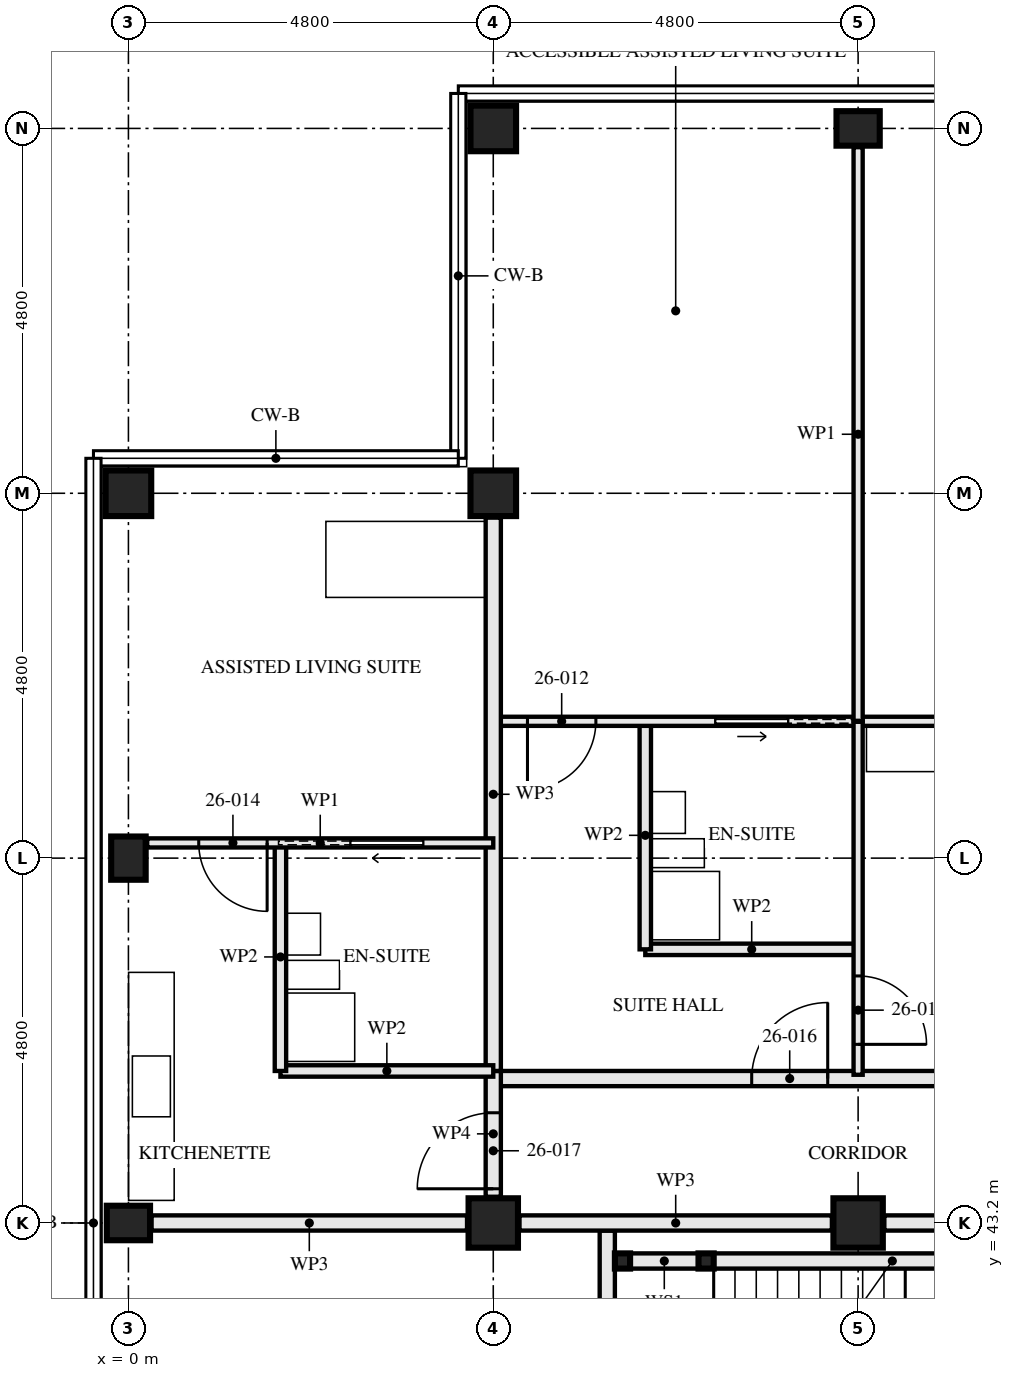
"""IFC4 building model, lengths in metres.
Left out: names, types, materials, properties, quantities, classifications, styles, units other than length and angle.
Written with IfcOpenShell. Run it as: python <this file> out.ifc"""

import sys

from ifc_helpers import new_model, si_unit, direction, frame, frame_2d, origin, origin_2d, place, context, subcontext, project, spatial, rectangle, hollow_rectangle, i_section, extrude, element, fill, save


model = new_model("IFC4")
c1 = context("Model", 3, precision=1e-05, world=origin(), true_north=direction((0.0, 1.0)))
c2 = subcontext(c1, "Body", "Model", "MODEL_VIEW")
j1 = project(units=[si_unit("LENGTHUNIT", "METRE"), si_unit("PLANEANGLEUNIT", "RADIAN")], contexts=[c1])
p1 = place(None, origin())
s1 = spatial("IfcSite", under=j1, at=p1, CompositionType="ELEMENT")
p2 = place(p1, origin())
s2 = spatial("IfcBuilding", under=s1, at=p2, CompositionType="ELEMENT")
p3 = place(p2, frame((0.0, 0.0, 98.0)))
s3 = spatial("IfcBuildingStorey", under=s2, at=p3, CompositionType="ELEMENT", Elevation=98.0)
for number, where, z_axis, x_axis in (
    (1, (0.0, 43.2, 0.0), (0.0, 0.0, 1.0), (0.0, 1.0, 0.0)),
    (2, (0.0, 48.0, 0.0), (0.0, 0.0, 1.0), (1.0, 0.0, 0.0)),
):
    element("IfcColumn", number, at=place(p3, frame(where, z_axis=z_axis, x_axis=x_axis)), inside=s3, PredefinedType="COLUMN", context=c2, shape_type="SweptSolid", body=[
        extrude(i_section(OverallWidth=0.454, OverallDepth=0.569, WebThickness=0.078, FlangeThickness=0.125, FilletRadius=0.015, at=origin_2d()), origin(), (0.0, 0.0, 1.0), 3.5),
    ])
p4 = place(p3, frame((0.0, 52.8, 0.0), z_axis=(0.0, 0.0, 1.0), x_axis=(0.0, 1.0, 0.0)))
e3 = element("IfcColumn", 3, at=p4, inside=s3, PredefinedType="COLUMN", context=c2, shape_type="SweptSolid", body=[
    extrude(hollow_rectangle(XDim=0.6, YDim=0.6, WallThickness=0.05, at=origin_2d()), origin(), (0.0, 0.0, 1.0), 3.5),
])
p5 = place(p3, frame((4.8, 43.2, 0.0), z_axis=(0.0, 0.0, 1.0), x_axis=(0.0, 1.0, 0.0)))
e4 = element("IfcColumn", 4, at=p5, inside=s3, PredefinedType="COLUMN", context=c2, shape_type="SweptSolid", body=[
    extrude(hollow_rectangle(XDim=0.65, YDim=0.65, WallThickness=0.05, at=origin_2d()), origin(), (0.0, 0.0, 1.0), 3.5),
])
for number, where, z_axis, x_axis in (
    (5, (4.8, 52.8, 0.0), (0.0, 0.0, 1.0), (0.0, 1.0, 0.0)),
    (6, (4.8, 57.6, 0.0), (0.0, 0.0, 1.0), (0.0, 1.0, 0.0)),
):
    element("IfcColumn", number, at=place(p3, frame(where, z_axis=z_axis, x_axis=x_axis)), inside=s3, PredefinedType="COLUMN", context=c2, shape_type="SweptSolid", body=[
        extrude(hollow_rectangle(XDim=0.6, YDim=0.6, WallThickness=0.05, at=origin_2d()), origin(), (0.0, 0.0, 1.0), 3.5),
    ])
p6 = place(p3, frame((9.6, 43.2, 0.0), z_axis=(0.0, 0.0, 1.0), x_axis=(0.0, 1.0, 0.0)))
e7 = element("IfcColumn", 7, at=p6, inside=s3, PredefinedType="COLUMN", context=c2, shape_type="SweptSolid", body=[
    extrude(hollow_rectangle(XDim=0.65, YDim=0.65, WallThickness=0.05, at=origin_2d()), origin(), (0.0, 0.0, 1.0), 3.5),
])
p7 = place(p3, frame((9.6, 57.6, 0.0), z_axis=(0.0, 0.0, 1.0), x_axis=(0.0, 1.0, 0.0)))
e8 = element("IfcColumn", 8, at=p7, inside=s3, PredefinedType="COLUMN", context=c2, shape_type="SweptSolid", body=[
    extrude(i_section(OverallWidth=0.454, OverallDepth=0.569, WebThickness=0.078, FlangeThickness=0.125, FilletRadius=0.015, at=origin_2d()), origin(), (0.0, 0.0, 1.0), 3.5),
])
for number, where, z_axis, x_axis in (
    (9, (6.5, 42.7, 0.0), (0.0, 0.0, 1.0), (1.0, 0.0, 0.0)),
    (10, (7.6, 42.7, 0.0), (0.0, 0.0, 1.0), (1.0, 0.0, 0.0)),
):
    element("IfcColumn", number, at=place(p3, frame(where, z_axis=z_axis, x_axis=x_axis)), inside=s3, PredefinedType="COLUMN", context=c2, shape_type="SweptSolid", body=[
        extrude(hollow_rectangle(XDim=0.2, YDim=0.2, WallThickness=0.008, at=origin_2d()), origin(), (0.0, 0.0, 1.0), 3.33),
    ])
p8 = place(p3, frame((6.6, 42.7, 0.0), z_axis=(0.0, 0.0, 1.0), x_axis=(1.0, 0.0, 0.0)))
e11 = element("IfcWall", 11, at=p8, inside=s3, PredefinedType="SOLIDWALL", context=c2, shape_type="SweptSolid", body=[
    extrude(rectangle(XDim=0.9, YDim=0.2, at=frame_2d((0.45, 0.0))), origin(), (0.0, 0.0, 1.0), 2.99),
])
p9 = place(p3, frame((7.7, 42.7, 0.0), z_axis=(0.0, 0.0, 1.0), x_axis=(1.0, 0.0, 0.0)))
e12 = element("IfcWall", 12, at=p9, inside=s3, PredefinedType="SOLIDWALL", context=c2, shape_type="SweptSolid", body=[
    extrude(rectangle(XDim=4.7, YDim=0.2, at=frame_2d((2.35, 0.0))), origin(), (0.0, 0.0, 1.0), 2.99),
])
p10 = place(p3, frame((6.3, 43.1, 0.0), z_axis=(0.0, 0.0, 1.0), x_axis=(0.0, -1.0, 0.0)))
e13 = element("IfcWall", 13, at=p10, inside=s3, PredefinedType="SOLIDWALL", context=c2, shape_type="SweptSolid", body=[
    extrude(rectangle(XDim=3.3, YDim=0.2, at=frame_2d((1.65, 0.0))), origin(), (0.0, 0.0, 1.0), 3.33),
])
p11 = place(p3, frame((6.8, 49.8, 0.0), z_axis=(0.0, 0.0, 1.0), x_axis=(0.0, -1.0, 0.0)))
e14 = element("IfcWall", 14, at=p11, inside=s3, PredefinedType="PARTITIONING", context=c2, shape_type="SweptSolid", body=[
    extrude(rectangle(XDim=3.0, YDim=0.15, at=frame_2d((1.5, 0.0))), origin(), (0.0, 0.0, 1.0), 2.55),
])
p12 = place(p3, frame((9.6, 46.8, 0.0), z_axis=(0.0, 0.0, 1.0), x_axis=(-1.0, 0.0, 0.0)))
e15 = element("IfcWall", 15, at=p12, inside=s3, PredefinedType="PARTITIONING", context=c2, shape_type="SweptSolid", body=[
    extrude(rectangle(XDim=2.8, YDim=0.15, at=frame_2d((1.4, 0.0))), origin(), (0.0, 0.0, 1.0), 3.33),
])
p13 = place(p3, frame((9.6, 49.8, 0.0), z_axis=(0.0, 0.0, 1.0), x_axis=(0.0, -1.0, 0.0)))
e16 = element("IfcWall", 16, at=p13, inside=s3, PredefinedType="PARTITIONING", context=c2, shape_type="SweptSolid", body=[
    extrude(rectangle(XDim=4.65, YDim=0.12, at=frame_2d((2.325, 0.0))), origin(), (0.0, 0.0, 1.0), 2.55),
])
p14 = place(p13, frame((3.35, 0.0, 0.0)))
e17 = element("IfcOpeningElement", 17, at=p14, cuts=e16, PredefinedType="OPENING", context=c2, shape_type="SweptSolid", body=[
    extrude(rectangle(XDim=0.9, YDim=2.1, at=frame_2d((0.45, 1.05))), frame((0.0, 0.071, 0.0), z_axis=(0.0, -1.0, 0.0), x_axis=(1.0, 0.0, 0.0)), (0.0, 0.0, 1.0), 0.141),
])
p15 = place(p3, frame((14.4, 49.8, 0.0), z_axis=(0.0, 0.0, 1.0), x_axis=(-1.0, 0.0, 0.0)))
e18 = element("IfcWall", 18, at=p15, inside=s3, PredefinedType="PARTITIONING", context=c2, shape_type="SweptSolid", body=[
    extrude(rectangle(XDim=4.8, YDim=0.12, at=frame_2d((2.4, 0.0))), origin(), (0.0, 0.0, 1.0), 3.33),
])
p16 = place(p15, frame((0.45, 0.0, 0.0)))
e19 = element("IfcOpeningElement", 19, at=p16, cuts=e18, PredefinedType="OPENING", context=c2, shape_type="SweptSolid", body=[
    extrude(rectangle(XDim=0.9, YDim=2.1, at=frame_2d((0.45, 1.05))), frame((0.0, 0.071, 0.0), z_axis=(0.0, -1.0, 0.0), x_axis=(1.0, 0.0, 0.0)), (0.0, 0.0, 1.0), 0.141),
])
p17 = place(p3, frame((9.6, 49.8, 0.0), z_axis=(0.0, 0.0, 1.0), x_axis=(-1.0, 0.0, 0.0)))
e20 = element("IfcWall", 20, at=p17, inside=s3, PredefinedType="PARTITIONING", context=c2, shape_type="SweptSolid", body=[
    extrude(rectangle(XDim=4.8, YDim=0.12, at=frame_2d((2.4, 0.0))), origin(), (0.0, 0.0, 1.0), 3.33),
])
p18 = place(p17, frame((3.45, 0.0, 0.0)))
e21 = element("IfcOpeningElement", 21, at=p18, cuts=e20, PredefinedType="OPENING", context=c2, shape_type="SweptSolid", body=[
    extrude(rectangle(XDim=0.9, YDim=2.1, at=frame_2d((0.45, 1.05))), frame((0.0, 0.071, 0.0), z_axis=(0.0, -1.0, 0.0), x_axis=(1.0, 0.0, 0.0)), (0.0, 0.0, 1.0), 0.141),
])
p19 = place(p17, frame((0.925, 0.0, 0.0)))
e22 = element("IfcOpeningElement", 22, at=p19, cuts=e20, PredefinedType="OPENING", context=c2, shape_type="SweptSolid", body=[
    extrude(rectangle(XDim=0.95, YDim=2.1, at=frame_2d((0.475, 1.05))), frame((0.0, 0.071, 0.0), z_axis=(0.0, -1.0, 0.0), x_axis=(1.0, 0.0, 0.0)), (0.0, 0.0, 1.0), 0.141),
])
p20 = place(p3, frame((9.6, 57.353, 0.0), z_axis=(0.0, 0.0, 1.0), x_axis=(0.0, -1.0, 0.0)))
e23 = element("IfcWall", 23, at=p20, inside=s3, PredefinedType="PARTITIONING", context=c2, shape_type="SweptSolid", body=[
    extrude(rectangle(XDim=7.553, YDim=0.12, at=frame_2d((3.776, 0.0))), origin(), (0.0, 0.0, 1.0), 2.55),
])
p21 = place(p3, frame((4.8, 52.48, 0.0), z_axis=(0.0, 0.0, 1.0), x_axis=(0.0, -1.0, 0.0)))
e24 = element("IfcWall", 24, at=p21, inside=s3, PredefinedType="PARTITIONING", context=c2, shape_type="SweptSolid", body=[
    extrude(rectangle(XDim=7.28, YDim=0.2, at=frame_2d((3.64, 0.0))), origin(), (0.0, 0.0, 1.0), 2.55),
])
p22 = place(p3, frame((2.0, 48.2, 0.0), z_axis=(0.0, 0.0, 1.0), x_axis=(0.0, -1.0, 0.0)))
e25 = element("IfcWall", 25, at=p22, inside=s3, PredefinedType="PARTITIONING", context=c2, shape_type="SweptSolid", body=[
    extrude(rectangle(XDim=3.0, YDim=0.15, at=frame_2d((1.5, 0.0))), origin(), (0.0, 0.0, 1.0), 2.55),
])
p23 = place(p3, frame((4.8, 45.2, 0.0), z_axis=(0.0, 0.0, 1.0), x_axis=(-1.0, 0.0, 0.0)))
e26 = element("IfcWall", 26, at=p23, inside=s3, PredefinedType="PARTITIONING", context=c2, shape_type="SweptSolid", body=[
    extrude(rectangle(XDim=2.8, YDim=0.15, at=frame_2d((1.4, 0.0))), origin(), (0.0, 0.0, 1.0), 3.33),
])
p24 = place(p3, frame((4.8, 48.2, 0.0), z_axis=(0.0, 0.0, 1.0), x_axis=(-1.0, 0.0, 0.0)))
e27 = element("IfcWall", 27, at=p24, inside=s3, PredefinedType="PARTITIONING", context=c2, shape_type="SweptSolid", body=[
    extrude(rectangle(XDim=4.553, YDim=0.12, at=frame_2d((2.276, 0.0))), origin(), (0.0, 0.0, 1.0), 3.33),
])
p25 = place(p24, frame((2.975, 0.0, 0.0)))
e28 = element("IfcOpeningElement", 28, at=p25, cuts=e27, PredefinedType="OPENING", context=c2, shape_type="SweptSolid", body=[
    extrude(rectangle(XDim=0.9, YDim=2.1, at=frame_2d((0.45, 1.05))), frame((0.0, 0.071, 0.0), z_axis=(0.0, -1.0, 0.0), x_axis=(1.0, 0.0, 0.0)), (0.0, 0.0, 1.0), 0.141),
])
p26 = place(p24, frame((0.925, 0.0, 0.0)))
e29 = element("IfcOpeningElement", 29, at=p26, cuts=e27, PredefinedType="OPENING", context=c2, shape_type="SweptSolid", body=[
    extrude(rectangle(XDim=0.95, YDim=2.1, at=frame_2d((0.475, 1.05))), frame((0.0, 0.071, 0.0), z_axis=(0.0, -1.0, 0.0), x_axis=(1.0, 0.0, 0.0)), (0.0, 0.0, 1.0), 0.141),
])
p27 = place(p3, frame((14.4, 45.1, 0.0), z_axis=(0.0, 0.0, 1.0), x_axis=(-1.0, 0.0, 0.0)))
e30 = element("IfcWall", 30, at=p27, inside=s3, PredefinedType="PARTITIONING", context=c2, shape_type="SweptSolid", body=[
    extrude(rectangle(XDim=9.6, YDim=0.2, at=frame_2d((4.8, 0.0))), origin(), (0.0, 0.0, 1.0), 3.33),
])
p28 = place(p27, frame((5.2, 0.0, 0.0)))
e31 = element("IfcOpeningElement", 31, at=p28, cuts=e30, PredefinedType="OPENING", context=c2, shape_type="SweptSolid", body=[
    extrude(rectangle(XDim=1.0, YDim=2.1, at=frame_2d((0.5, 1.05))), frame((0.0, 0.111, 0.0), z_axis=(0.0, -1.0, 0.0), x_axis=(1.0, 0.0, 0.0)), (0.0, 0.0, 1.0), 0.221),
])
p29 = place(p3, frame((4.8, 45.2, 0.0), z_axis=(0.0, 0.0, 1.0), x_axis=(0.0, -1.0, 0.0)))
e32 = element("IfcWall", 32, at=p29, inside=s3, PredefinedType="PARTITIONING", context=c2, shape_type="SweptSolid", body=[
    extrude(rectangle(XDim=1.655, YDim=0.2, at=frame_2d((0.828, 0.0))), origin(), (0.0, 0.0, 1.0), 3.33),
])
p30 = place(p29, frame((0.55, 0.0, 0.0)))
e33 = element("IfcOpeningElement", 33, at=p30, cuts=e32, PredefinedType="OPENING", context=c2, shape_type="SweptSolid", body=[
    extrude(rectangle(XDim=1.0, YDim=2.1, at=frame_2d((0.5, 1.05))), frame((0.0, 0.111, 0.0), z_axis=(0.0, -1.0, 0.0), x_axis=(1.0, 0.0, 0.0)), (0.0, 0.0, 1.0), 0.221),
])
p31 = place(p3, frame((12.5, 43.2, 0.0), z_axis=(0.0, 0.0, 1.0), x_axis=(-1.0, 0.0, 0.0)))
e34 = element("IfcWall", 34, at=p31, inside=s3, PredefinedType="PARTITIONING", context=c2, shape_type="SweptSolid", body=[
    extrude(rectangle(XDim=2.555, YDim=0.2, at=frame_2d((1.277, 0.0))), origin(), (0.0, 0.0, 1.0), 2.32),
])
p32 = place(p3, frame((9.255, 43.2, 0.0), z_axis=(0.0, 0.0, 1.0), x_axis=(-1.0, 0.0, 0.0)))
e35 = element("IfcWall", 35, at=p32, inside=s3, PredefinedType="PARTITIONING", context=c2, shape_type="SweptSolid", body=[
    extrude(rectangle(XDim=4.11, YDim=0.2, at=frame_2d((2.055, 0.0))), origin(), (0.0, 0.0, 1.0), 2.32),
])
p33 = place(p3, frame((4.455, 43.2, 0.0), z_axis=(0.0, 0.0, 1.0), x_axis=(-1.0, 0.0, 0.0)))
e36 = element("IfcWall", 36, at=p33, inside=s3, PredefinedType="PARTITIONING", context=c2, shape_type="SweptSolid", body=[
    extrude(rectangle(XDim=4.151, YDim=0.2, at=frame_2d((2.075, 0.0))), origin(), (0.0, 0.0, 1.0), 2.32),
])
p34 = place(p14, origin())
e37 = element("IfcDoor", 37, at=p34, inside=s3, OperationType="SINGLE_SWING_LEFT", PredefinedType="DOOR", context=c2, shape_type="SweptSolid", body=[
    extrude(rectangle(XDim=0.9, YDim=2.1, at=frame_2d((0.45, 1.05))), frame((0.0, 0.022, 0.0), z_axis=(0.0, -1.0, 0.0), x_axis=(1.0, 0.0, 0.0)), (0.0, 0.0, 1.0), 0.044),
])
fill(e17, e37)
p35 = place(p18, origin())
e38 = element("IfcDoor", 38, at=p35, inside=s3, OperationType="SINGLE_SWING_LEFT", PredefinedType="DOOR", context=c2, shape_type="SweptSolid", body=[
    extrude(rectangle(XDim=0.9, YDim=2.1, at=frame_2d((0.45, 1.05))), frame((0.0, 0.022, 0.0), z_axis=(0.0, -1.0, 0.0), x_axis=(1.0, 0.0, 0.0)), (0.0, 0.0, 1.0), 0.044),
])
fill(e21, e38)
p36 = place(p19, origin())
e39 = element("IfcDoor", 39, at=p36, inside=s3, OperationType="SLIDING_TO_RIGHT", PredefinedType="DOOR", context=c2, shape_type="SweptSolid", body=[
    extrude(rectangle(XDim=0.95, YDim=2.1, at=frame_2d((0.475, 1.05))), frame((0.0, 0.022, 0.0), z_axis=(0.0, -1.0, 0.0), x_axis=(1.0, 0.0, 0.0)), (0.0, 0.0, 1.0), 0.044),
])
fill(e22, e39)
p37 = place(p25, origin())
e40 = element("IfcDoor", 40, at=p37, inside=s3, OperationType="SINGLE_SWING_RIGHT", PredefinedType="DOOR", context=c2, shape_type="SweptSolid", body=[
    extrude(rectangle(XDim=0.9, YDim=2.1, at=frame_2d((0.45, 1.05))), frame((0.0, 0.022, 0.0), z_axis=(0.0, -1.0, 0.0), x_axis=(1.0, 0.0, 0.0)), (0.0, 0.0, 1.0), 0.044),
])
fill(e28, e40)
p38 = place(p26, origin())
e41 = element("IfcDoor", 41, at=p38, inside=s3, OperationType="SLIDING_TO_LEFT", PredefinedType="DOOR", context=c2, shape_type="SweptSolid", body=[
    extrude(rectangle(XDim=0.95, YDim=2.1, at=frame_2d((0.475, 1.05))), frame((0.0, 0.022, 0.0), z_axis=(0.0, -1.0, 0.0), x_axis=(1.0, 0.0, 0.0)), (0.0, 0.0, 1.0), 0.044),
])
fill(e29, e41)
p39 = place(p28, frame((1.0, 0.0, 0.0), z_axis=(0.0, 0.0, 1.0), x_axis=(-1.0, 0.0, 0.0)))
e42 = element("IfcDoor", 42, at=p39, inside=s3, OperationType="SINGLE_SWING_LEFT", PredefinedType="DOOR", context=c2, shape_type="SweptSolid", body=[
    extrude(rectangle(XDim=1.0, YDim=2.1, at=frame_2d((0.5, 1.05))), frame((0.0, 0.027, 0.0), z_axis=(0.0, -1.0, 0.0), x_axis=(1.0, 0.0, 0.0)), (0.0, 0.0, 1.0), 0.054),
])
fill(e31, e42)
p40 = place(p30, frame((1.0, 0.0, 0.0), z_axis=(0.0, 0.0, 1.0), x_axis=(-1.0, 0.0, 0.0)))
e43 = element("IfcDoor", 43, at=p40, inside=s3, OperationType="SINGLE_SWING_RIGHT", PredefinedType="DOOR", context=c2, shape_type="SweptSolid", body=[
    extrude(rectangle(XDim=1.0, YDim=2.1, at=frame_2d((0.5, 1.05))), frame((0.0, 0.027, 0.0), z_axis=(0.0, -1.0, 0.0), x_axis=(1.0, 0.0, 0.0)), (0.0, 0.0, 1.0), 0.054),
])
fill(e33, e43)
save(model, sys.argv[1])
